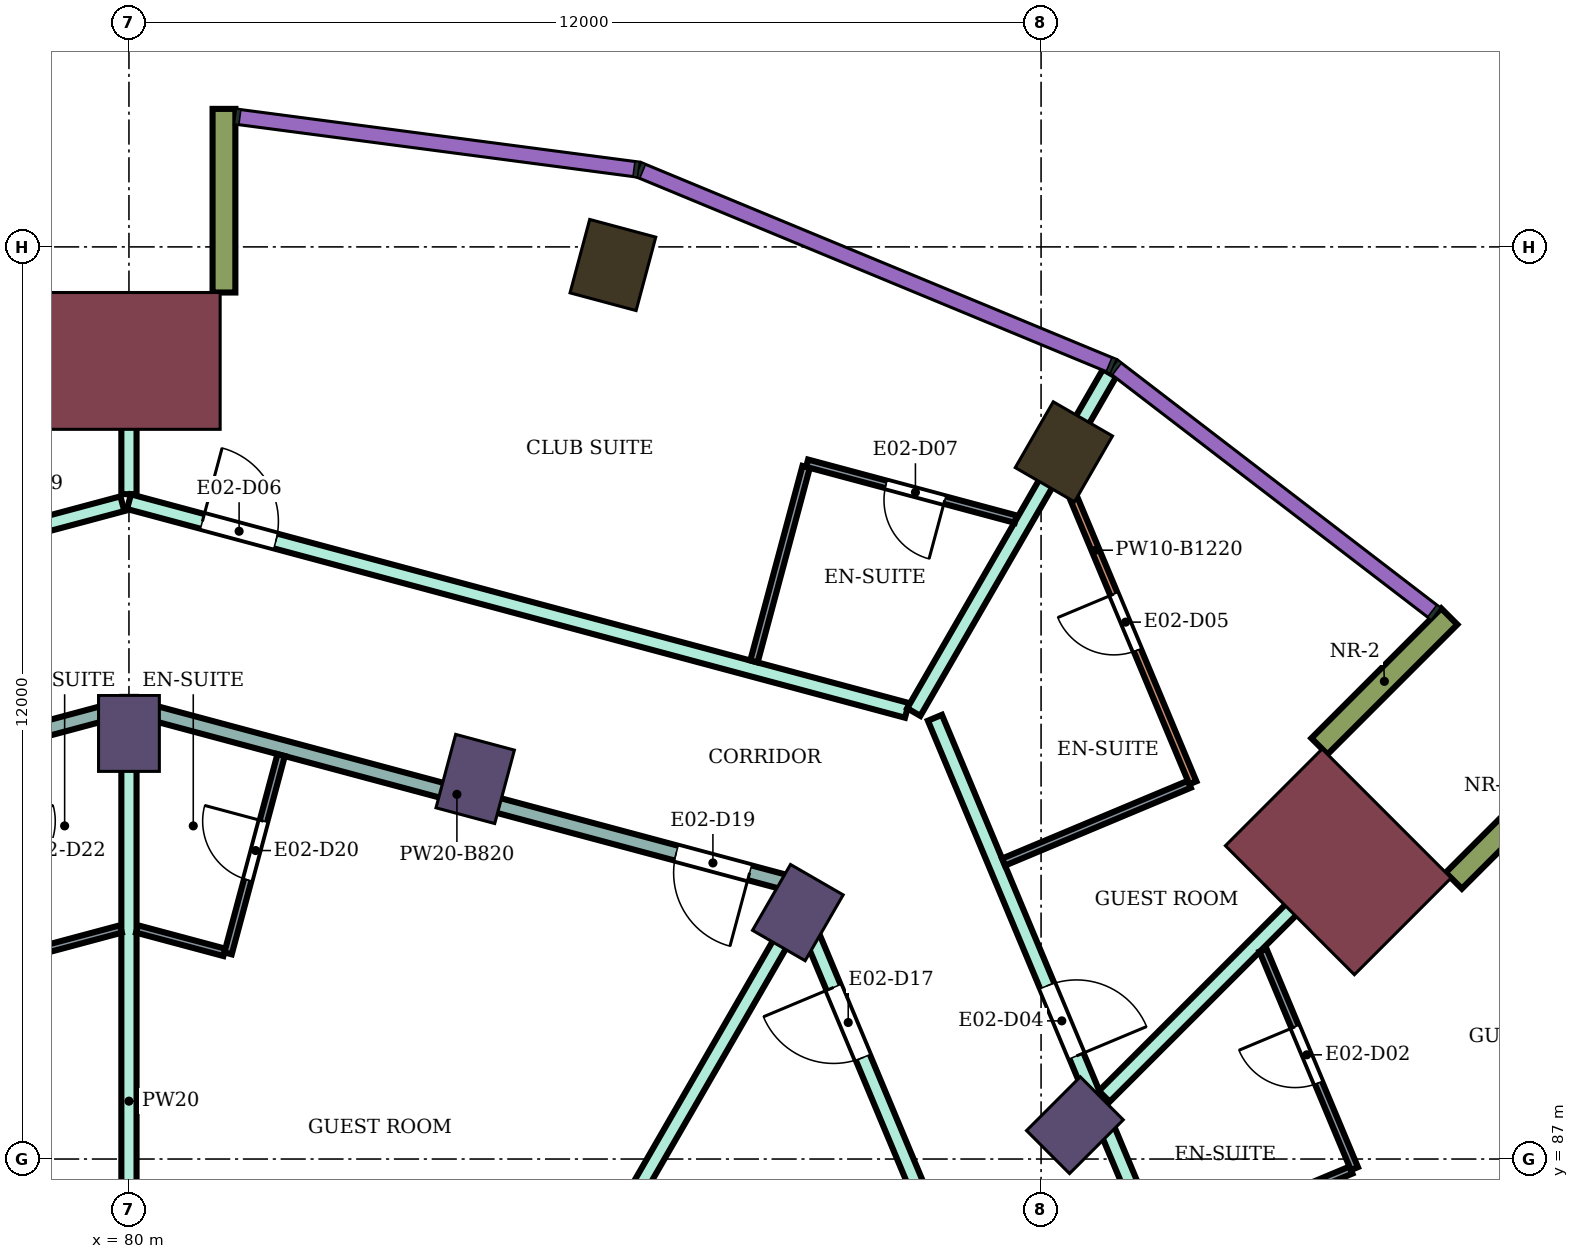
"""IFC4 building model, lengths in metres.
Left out: names, types, materials, properties, quantities, classifications, styles, units other than length and angle.
Written with IfcOpenShell. Run it as: python <this file> out.ifc"""

import sys

from ifc_helpers import new_model, si_unit, direction, frame, frame_2d, origin, origin_2d, place, context, subcontext, project, spatial, rectangle, extrude, element, fill, save


model = new_model("IFC4")
c1 = context("Model", 3, precision=1e-05, world=origin(), true_north=direction((0.0, 1.0)))
c2 = subcontext(c1, "Body", "Model", "MODEL_VIEW")
j1 = project(units=[si_unit("LENGTHUNIT", "METRE"), si_unit("PLANEANGLEUNIT", "RADIAN")], contexts=[c1])
p1 = place(None, origin())
s1 = spatial("IfcSite", under=j1, at=p1, CompositionType="ELEMENT")
p2 = place(p1, origin())
s2 = spatial("IfcBuilding", under=s1, at=p2, CompositionType="ELEMENT")
p3 = place(p2, frame((0.0, 0.0, 130.2)))
s3 = spatial("IfcBuildingStorey", under=s2, at=p3, CompositionType="ELEMENT", Elevation=130.2)
for number, where, z_axis, x_axis in (
    (1, (92.3, 96.304, 0.0), (0.0, 0.0, 1.0), (0.5, 0.866, 0.0)),
    (2, (86.367, 98.762, 0.0), (0.0, 0.0, 1.0), (0.259, 0.966, 0.0)),
):
    element("IfcColumn", number, at=place(p3, frame(where, z_axis=z_axis, x_axis=x_axis)), inside=s3, PredefinedType="COLUMN", context=c2, shape_type="SweptSolid", body=[
        extrude(rectangle(XDim=1.0, YDim=0.9, at=origin_2d()), origin(), (0.0, 0.0, 1.0), 3.9),
    ])
for number, where, z_axis, x_axis in (
    (3, (92.445, 87.445, 0.0), (0.0, 0.0, 1.0), (0.707, 0.707, 0.0)),
    (4, (88.8, 90.242, 0.0), (0.0, 0.0, 1.0), (0.5, 0.866, 0.0)),
    (5, (84.555, 92.0, 0.0), (0.0, 0.0, 1.0), (0.259, 0.966, 0.0)),
    (6, (80.0, 92.6, 0.0), (0.0, 0.0, 1.0), (0.0, 1.0, 0.0)),
):
    element("IfcColumn", number, at=place(p3, frame(where, z_axis=z_axis, x_axis=x_axis)), inside=s3, PredefinedType="COLUMN", context=c2, shape_type="SweptSolid", body=[
        extrude(rectangle(XDim=1.0, YDim=0.8, at=origin_2d()), origin(), (0.0, 0.0, 1.0), 3.9),
    ])
for number, where, z_axis, x_axis in (
    (7, (95.91, 90.91, 0.0), (0.0, 0.0, 1.0), (0.707, 0.707, 0.0)),
    (8, (80.0, 97.5, 0.0), (0.0, 0.0, 1.0), (0.0, 1.0, 0.0)),
):
    element("IfcColumn", number, at=place(p3, frame(where, z_axis=z_axis, x_axis=x_axis)), inside=s3, PredefinedType="COLUMN", context=c2, shape_type="SweptSolid", body=[
        extrude(rectangle(XDim=1.8, YDim=2.4, at=origin_2d()), origin(), (0.0, 0.0, 1.0), 3.9),
    ])
for number, where, z_axis, x_axis in (
    (9, (97.43, 90.662, 0.0), (0.0, 0.0, 1.0), (0.707, 0.707, 0.0)),
    (10, (95.662, 92.43, 0.0), (0.0, 0.0, 1.0), (0.707, 0.707, 0.0)),
    (11, (81.25, 98.4, 0.0), (0.0, 0.0, 1.0), (0.0, 1.0, 0.0)),
):
    element("IfcWall", number, at=place(p3, frame(where, z_axis=z_axis, x_axis=x_axis)), inside=s3, PredefinedType="NOTDEFINED", context=c2, shape_type="SweptSolid", body=[
        extrude(rectangle(XDim=2.416, YDim=0.3, at=frame_2d((1.208, 0.0))), origin(), (0.0, 0.0, 1.0), 3.9),
    ])
p4 = place(p3, frame((69.397, 92.805, 0.0), z_axis=(0.0, 0.0, 1.0), x_axis=(0.965971666602, 0.258647906087, 0.0)))
e12 = element("IfcWall", 12, at=p4, inside=s3, PredefinedType="PARTITIONING", context=c2, shape_type="SweptSolid", body=[
    extrude(rectangle(XDim=10.887, YDim=0.2, at=frame_2d((5.443, 0.0))), origin(), (0.0, 0.0, 1.0), 3.45),
])
p5 = place(p4, frame((6.163, 0.0, 0.0)))
e13 = element("IfcOpeningElement", 13, at=p5, cuts=e12, PredefinedType="OPENING", context=c2, shape_type="SweptSolid", body=[
    extrude(rectangle(XDim=1.0, YDim=2.1, at=frame_2d((0.5, 1.05))), frame((0.0, 0.11, 0.0), z_axis=(0.0, -1.0, 0.0), x_axis=(1.0, 0.0, 0.0)), (0.0, 0.0, 1.0), 0.22),
])
p6 = place(p4, frame((2.461, 0.0, 0.0)))
e14 = element("IfcOpeningElement", 14, at=p6, cuts=e12, PredefinedType="OPENING", context=c2, shape_type="SweptSolid", body=[
    extrude(rectangle(XDim=1.0, YDim=2.1, at=frame_2d((0.5, 1.05))), frame((0.0, 0.11, 0.0), z_axis=(0.0, -1.0, 0.0), x_axis=(1.0, 0.0, 0.0)), (0.0, 0.0, 1.0), 0.22),
])
p7 = place(p3, frame((71.303, 90.625, 0.0), z_axis=(0.0, 0.0, 1.0), x_axis=(0.965971868307, 0.258647152776, 0.0)))
e15 = element("IfcWall", 15, at=p7, inside=s3, PredefinedType="PARTITIONING", context=c2, shape_type="SweptSolid", body=[
    extrude(rectangle(XDim=8.874, YDim=0.2, at=frame_2d((4.437, 0.0))), origin(), (0.0, 0.0, 1.0), 3.08),
])
p8 = place(p7, frame((0.55, 0.0, 0.0)))
e16 = element("IfcOpeningElement", 16, at=p8, cuts=e15, PredefinedType="OPENING", context=c2, shape_type="SweptSolid", body=[
    extrude(rectangle(XDim=1.0, YDim=2.1, at=frame_2d((0.5, 1.05))), frame((0.0, 0.11, 0.0), z_axis=(0.0, -1.0, 0.0), x_axis=(1.0, 0.0, 0.0)), (0.0, 0.0, 1.0), 0.22),
])
p9 = place(p3, frame((80.0, 82.699, 0.0), z_axis=(0.0, 0.0, 1.0), x_axis=(0.0, 1.0, 0.0)))
e17 = element("IfcWall", 17, at=p9, inside=s3, PredefinedType="PARTITIONING", context=c2, shape_type="SweptSolid", body=[
    extrude(rectangle(XDim=10.125, YDim=0.2, at=frame_2d((5.062, 0.0))), origin(), (0.0, 0.0, 1.0), 3.45),
])
p10 = place(p3, frame((80.0, 92.954, 0.0), z_axis=(0.0, 0.0, 1.0), x_axis=(0.96592536278, -0.258820774936, 0.0)))
e18 = element("IfcWall", 18, at=p10, inside=s3, PredefinedType="PARTITIONING", context=c2, shape_type="SweptSolid", body=[
    extrude(rectangle(XDim=8.934, YDim=0.2, at=frame_2d((4.467, 0.0))), origin(), (0.0, 0.0, 1.0), 3.08),
])
p11 = place(p10, frame((7.454, 0.0, 0.0)))
e19 = element("IfcOpeningElement", 19, at=p11, cuts=e18, PredefinedType="OPENING", context=c2, shape_type="SweptSolid", body=[
    extrude(rectangle(XDim=1.0, YDim=2.1, at=frame_2d((0.5, 1.05))), frame((0.0, 0.11, 0.0), z_axis=(0.0, -1.0, 0.0), x_axis=(1.0, 0.0, 0.0)), (0.0, 0.0, 1.0), 0.22),
])
p12 = place(p3, frame((80.0, 95.747, 0.0), z_axis=(0.0, 0.0, 1.0), x_axis=(0.0, 1.0, 0.0)))
e20 = element("IfcWall", 20, at=p12, inside=s3, PredefinedType="PARTITIONING", context=c2, shape_type="SweptSolid", body=[
    extrude(rectangle(XDim=2.452, YDim=0.2, at=frame_2d((1.226, 0.0))), origin(), (0.0, 0.0, 1.0), 3.45),
])
p13 = place(p3, frame((80.0, 95.648, 0.0), z_axis=(0.0, 0.0, 1.0), x_axis=(0.965852259202, -0.259093445292, 0.0)))
e21 = element("IfcWall", 21, at=p13, inside=s3, PredefinedType="PARTITIONING", context=c2, shape_type="SweptSolid", body=[
    extrude(rectangle(XDim=10.597, YDim=0.2, at=frame_2d((5.298, 0.0))), origin(), (0.0, 0.0, 1.0), 3.45),
])
p14 = place(p13, frame((1.0, 0.0, 0.0)))
e22 = element("IfcOpeningElement", 22, at=p14, cuts=e21, PredefinedType="OPENING", context=c2, shape_type="SweptSolid", body=[
    extrude(rectangle(XDim=1.0, YDim=2.1, at=frame_2d((0.5, 1.05))), frame((0.0, 0.11, 0.0), z_axis=(0.0, -1.0, 0.0), x_axis=(1.0, 0.0, 0.0)), (0.0, 0.0, 1.0), 0.22),
])
p15 = place(p3, frame((83.85, 81.667, 0.0), z_axis=(0.0, 0.0, 1.0), x_axis=(0.500092047414, 0.865972253663, 0.0)))
e23 = element("IfcWall", 23, at=p15, inside=s3, PredefinedType="PARTITIONING", context=c2, shape_type="SweptSolid", body=[
    extrude(rectangle(XDim=9.778, YDim=0.2, at=frame_2d((4.889, 0.0))), origin(), (0.0, 0.0, 1.0), 3.45),
])
p16 = place(p3, frame((88.698, 90.624, 0.0), z_axis=(0.0, 0.0, 1.0), x_axis=(0.386027055918, -0.922487459047, 0.0)))
e24 = element("IfcWall", 24, at=p16, inside=s3, PredefinedType="PARTITIONING", context=c2, shape_type="SweptSolid", body=[
    extrude(rectangle(XDim=7.832, YDim=0.2, at=frame_2d((3.916, 0.0))), origin(), (0.0, 0.0, 1.0), 3.45),
])
p17 = place(p16, frame((1.482, 0.0, 0.0)))
e25 = element("IfcOpeningElement", 25, at=p17, cuts=e24, PredefinedType="OPENING", context=c2, shape_type="SweptSolid", body=[
    extrude(rectangle(XDim=1.0, YDim=2.1, at=frame_2d((0.5, 1.05))), frame((0.0, 0.11, 0.0), z_axis=(0.0, -1.0, 0.0), x_axis=(1.0, 0.0, 0.0)), (0.0, 0.0, 1.0), 0.22),
])
p18 = place(p3, frame((90.325, 92.88, 0.0), z_axis=(0.0, 0.0, 1.0), x_axis=(0.500084891114, 0.865976386329, 0.0)))
e26 = element("IfcWall", 26, at=p18, inside=s3, PredefinedType="PARTITIONING", context=c2, shape_type="SweptSolid", body=[
    extrude(rectangle(XDim=5.15, YDim=0.2, at=frame_2d((2.575, 0.0))), origin(), (0.0, 0.0, 1.0), 3.45),
])
p19 = place(p3, frame((90.604, 92.805, 0.0), z_axis=(0.0, 0.0, 1.0), x_axis=(0.386199042801, -0.922415470024, 0.0)))
e27 = element("IfcWall", 27, at=p19, inside=s3, PredefinedType="PARTITIONING", context=c2, shape_type="SweptSolid", body=[
    extrude(rectangle(XDim=8.48, YDim=0.2, at=frame_2d((4.24, 0.0))), origin(), (0.0, 0.0, 1.0), 3.45),
])
p20 = place(p19, frame((3.823, 0.0, 0.0)))
e28 = element("IfcOpeningElement", 28, at=p20, cuts=e27, PredefinedType="OPENING", context=c2, shape_type="SweptSolid", body=[
    extrude(rectangle(XDim=1.0, YDim=2.1, at=frame_2d((0.5, 1.05))), frame((0.0, 0.11, 0.0), z_axis=(0.0, -1.0, 0.0), x_axis=(1.0, 0.0, 0.0)), (0.0, 0.0, 1.0), 0.22),
])
p21 = place(p3, frame((92.832, 87.825, 0.0), z_axis=(0.0, 0.0, 1.0), x_axis=(0.707275688599, 0.706937833418, 0.0)))
e29 = element("IfcWall", 29, at=p21, inside=s3, PredefinedType="PARTITIONING", context=c2, shape_type="SweptSolid", body=[
    extrude(rectangle(XDim=5.058, YDim=0.2, at=frame_2d((2.529, 0.0))), origin(), (0.0, 0.0, 1.0), 3.45),
])
p22 = place(p3, frame((78.696, 89.706, 0.0), z_axis=(0.0, 0.0, 1.0), x_axis=(0.966002513606, 0.258532674351, 0.0)))
e30 = element("IfcWall", 30, at=p22, inside=s3, PredefinedType="PARTITIONING", context=c2, shape_type="SweptSolid", body=[
    extrude(rectangle(XDim=1.24, YDim=0.1, at=frame_2d((0.62, 0.0))), origin(), (0.0, 0.0, 1.0), 3.45),
])
p23 = place(p3, frame((80.106, 90.027, 0.0), z_axis=(0.0, 0.0, 1.0), x_axis=(0.966002973184, -0.258530957139, 0.0)))
e31 = element("IfcWall", 31, at=p23, inside=s3, PredefinedType="PARTITIONING", context=c2, shape_type="SweptSolid", body=[
    extrude(rectangle(XDim=1.19, YDim=0.1, at=frame_2d((0.595, 0.0))), origin(), (0.0, 0.0, 1.0), 3.45),
])
p24 = place(p3, frame((81.304, 89.706, 0.0), z_axis=(0.0, 0.0, 1.0), x_axis=(0.258608022684, 0.965982344872, 0.0)))
e32 = element("IfcWall", 32, at=p24, inside=s3, PredefinedType="PARTITIONING", context=c2, shape_type="SweptSolid", body=[
    extrude(rectangle(XDim=2.7, YDim=0.1, at=frame_2d((1.35, 0.0))), origin(), (0.0, 0.0, 1.0), 3.45),
])
p25 = place(p24, frame((1.0, 0.0, 0.0)))
e33 = element("IfcOpeningElement", 33, at=p25, cuts=e32, PredefinedType="OPENING", context=c2, shape_type="SweptSolid", body=[
    extrude(rectangle(XDim=0.8, YDim=2.1, at=frame_2d((0.4, 1.05))), frame((0.0, 0.06, 0.0), z_axis=(0.0, -1.0, 0.0), x_axis=(1.0, 0.0, 0.0)), (0.0, 0.0, 1.0), 0.12),
])
p26 = place(p3, frame((88.223, 93.547, 0.0), z_axis=(0.0, 0.0, 1.0), x_axis=(0.259021640683, 0.965871518194, 0.0)))
e34 = element("IfcWall", 34, at=p26, inside=s3, PredefinedType="PARTITIONING", context=c2, shape_type="SweptSolid", body=[
    extrude(rectangle(XDim=2.649, YDim=0.1, at=frame_2d((1.325, 0.0))), origin(), (0.0, 0.0, 1.0), 3.45),
])
p27 = place(p3, frame((88.922, 96.154, 0.0), z_axis=(0.0, 0.0, 1.0), x_axis=(0.965887418767, -0.258962341408, 0.0)))
e35 = element("IfcWall", 35, at=p27, inside=s3, PredefinedType="PARTITIONING", context=c2, shape_type="SweptSolid", body=[
    extrude(rectangle(XDim=2.841, YDim=0.1, at=frame_2d((1.42, 0.0))), origin(), (0.0, 0.0, 1.0), 3.45),
])
p28 = place(p27, frame((1.075, 0.0, 0.0)))
e36 = element("IfcOpeningElement", 36, at=p28, cuts=e35, PredefinedType="OPENING", context=c2, shape_type="SweptSolid", body=[
    extrude(rectangle(XDim=0.8, YDim=2.1, at=frame_2d((0.4, 1.05))), frame((0.0, 0.06, 0.0), z_axis=(0.0, -1.0, 0.0), x_axis=(1.0, 0.0, 0.0)), (0.0, 0.0, 1.0), 0.12),
])
p29 = place(p3, frame((91.507, 90.907, 0.0), z_axis=(0.0, 0.0, 1.0), x_axis=(0.922344808264, 0.38636777126, 0.0)))
e37 = element("IfcWall", 37, at=p29, inside=s3, PredefinedType="PARTITIONING", context=c2, shape_type="SweptSolid", body=[
    extrude(rectangle(XDim=2.65, YDim=0.1, at=frame_2d((1.325, 0.0))), origin(), (0.0, 0.0, 1.0), 3.45),
])
p30 = place(p3, frame((92.289, 96.03, 0.0), z_axis=(0.0, 0.0, 1.0), x_axis=(0.386237487323, -0.922399373041, 0.0)))
e38 = element("IfcWall", 38, at=p30, inside=s3, PredefinedType="PARTITIONING", context=c2, shape_type="SweptSolid", body=[
    extrude(rectangle(XDim=4.423, YDim=0.1, at=frame_2d((2.211, 0.0))), origin(), (0.0, 0.0, 1.0), 2.68),
])
p31 = place(p30, frame((1.731, 0.0, 0.0)))
e39 = element("IfcOpeningElement", 39, at=p31, cuts=e38, PredefinedType="OPENING", context=c2, shape_type="SweptSolid", body=[
    extrude(rectangle(XDim=0.8, YDim=2.1, at=frame_2d((0.4, 1.05))), frame((0.0, 0.06, 0.0), z_axis=(0.0, -1.0, 0.0), x_axis=(1.0, 0.0, 0.0)), (0.0, 0.0, 1.0), 0.12),
])
p32 = place(p3, frame((93.633, 85.831, 0.0), z_axis=(0.0, 0.0, 1.0), x_axis=(0.922344808264, 0.38636777126, 0.0)))
e40 = element("IfcWall", 40, at=p32, inside=s3, PredefinedType="PARTITIONING", context=c2, shape_type="SweptSolid", body=[
    extrude(rectangle(XDim=2.65, YDim=0.1, at=frame_2d((1.325, 0.0))), origin(), (0.0, 0.0, 1.0), 3.45),
])
p33 = place(p3, frame((94.8, 83.545, 0.0), z_axis=(0.0, 0.0, 1.0), x_axis=(0.86602264145, 0.500004784474, 0.0)))
e41 = element("IfcWall", 41, at=p33, inside=s3, PredefinedType="PARTITIONING", context=c2, shape_type="SweptSolid", body=[
    extrude(rectangle(XDim=8.708, YDim=0.1, at=frame_2d((4.354, 0.0))), origin(), (0.0, 0.0, 1.0), 3.45),
])
p34 = place(p33, frame((3.879, 0.0, 0.0)))
e42 = element("IfcOpeningElement", 42, at=p34, cuts=e41, PredefinedType="OPENING", context=c2, shape_type="SweptSolid", body=[
    extrude(rectangle(XDim=0.9, YDim=2.1, at=frame_2d((0.45, 1.05))), frame((0.0, 0.06, 0.0), z_axis=(0.0, -1.0, 0.0), x_axis=(1.0, 0.0, 0.0)), (0.0, 0.0, 1.0), 0.12),
])
p35 = place(p3, frame((94.919, 89.748, 0.0), z_axis=(0.0, 0.0, 1.0), x_axis=(0.386255913529, -0.922391657196, 0.0)))
e43 = element("IfcWall", 43, at=p35, inside=s3, PredefinedType="PARTITIONING", context=c2, shape_type="SweptSolid", body=[
    extrude(rectangle(XDim=3.116, YDim=0.1, at=frame_2d((1.558, 0.0))), origin(), (0.0, 0.0, 1.0), 3.45),
])
p36 = place(p35, frame((1.093, 0.0, 0.0)))
e44 = element("IfcOpeningElement", 44, at=p36, cuts=e43, PredefinedType="OPENING", context=c2, shape_type="SweptSolid", body=[
    extrude(rectangle(XDim=0.8, YDim=2.1, at=frame_2d((0.4, 1.05))), frame((0.0, 0.06, 0.0), z_axis=(0.0, -1.0, 0.0), x_axis=(1.0, 0.0, 0.0)), (0.0, 0.0, 1.0), 0.12),
])
p37 = place(p36, frame((0.8, 0.0, 0.0), z_axis=(0.0, 0.0, 1.0), x_axis=(-1.0, 0.0, 0.0)))
e45 = element("IfcDoor", 45, at=p37, inside=s3, OperationType="SINGLE_SWING_RIGHT", PredefinedType="DOOR", context=c2, shape_type="SweptSolid", body=[
    extrude(rectangle(XDim=0.8, YDim=2.1, at=frame_2d((0.4, 1.05))), frame((0.0, 0.025, 0.0), z_axis=(0.0, -1.0, 0.0), x_axis=(1.0, 0.0, 0.0)), (0.0, 0.0, 1.0), 0.05),
])
fill(e44, e45)
p38 = place(p20, origin())
e46 = element("IfcDoor", 46, at=p38, inside=s3, OperationType="SINGLE_SWING_RIGHT", PredefinedType="DOOR", context=c2, shape_type="SweptSolid", body=[
    extrude(rectangle(XDim=1.0, YDim=2.1, at=frame_2d((0.5, 1.05))), frame((0.0, 0.025, 0.0), z_axis=(0.0, -1.0, 0.0), x_axis=(1.0, 0.0, 0.0)), (0.0, 0.0, 1.0), 0.05),
])
fill(e28, e46)
p39 = place(p31, frame((0.8, 0.0, 0.0), z_axis=(0.0, 0.0, 1.0), x_axis=(-1.0, 0.0, 0.0)))
e47 = element("IfcDoor", 47, at=p39, inside=s3, OperationType="SINGLE_SWING_RIGHT", PredefinedType="DOOR", context=c2, shape_type="SweptSolid", body=[
    extrude(rectangle(XDim=0.8, YDim=2.1, at=frame_2d((0.4, 1.05))), frame((0.0, 0.025, 0.0), z_axis=(0.0, -1.0, 0.0), x_axis=(1.0, 0.0, 0.0)), (0.0, 0.0, 1.0), 0.05),
])
fill(e39, e47)
p40 = place(p14, origin())
e48 = element("IfcDoor", 48, at=p40, inside=s3, OperationType="SINGLE_SWING_LEFT", PredefinedType="DOOR", context=c2, shape_type="SweptSolid", body=[
    extrude(rectangle(XDim=1.0, YDim=2.1, at=frame_2d((0.5, 1.05))), frame((0.0, 0.025, 0.0), z_axis=(0.0, -1.0, 0.0), x_axis=(1.0, 0.0, 0.0)), (0.0, 0.0, 1.0), 0.05),
])
fill(e22, e48)
p41 = place(p28, frame((0.8, 0.0, 0.0), z_axis=(0.0, 0.0, 1.0), x_axis=(-1.0, 0.0, 0.0)))
e49 = element("IfcDoor", 49, at=p41, inside=s3, OperationType="SINGLE_SWING_LEFT", PredefinedType="DOOR", context=c2, shape_type="SweptSolid", body=[
    extrude(rectangle(XDim=0.8, YDim=2.1, at=frame_2d((0.4, 1.05))), frame((0.0, 0.025, 0.0), z_axis=(0.0, -1.0, 0.0), x_axis=(1.0, 0.0, 0.0)), (0.0, 0.0, 1.0), 0.05),
])
fill(e36, e49)
p42 = place(p17, frame((1.0, 0.0, 0.0), z_axis=(0.0, 0.0, 1.0), x_axis=(-1.0, 0.0, 0.0)))
e50 = element("IfcDoor", 50, at=p42, inside=s3, OperationType="SINGLE_SWING_RIGHT", PredefinedType="DOOR", context=c2, shape_type="SweptSolid", body=[
    extrude(rectangle(XDim=1.0, YDim=2.1, at=frame_2d((0.5, 1.05))), frame((0.0, 0.025, 0.0), z_axis=(0.0, -1.0, 0.0), x_axis=(1.0, 0.0, 0.0)), (0.0, 0.0, 1.0), 0.05),
])
fill(e25, e50)
p43 = place(p11, frame((1.0, 0.0, 0.0), z_axis=(0.0, 0.0, 1.0), x_axis=(-1.0, 0.0, 0.0)))
e51 = element("IfcDoor", 51, at=p43, inside=s3, OperationType="SINGLE_SWING_LEFT", PredefinedType="DOOR", context=c2, shape_type="SweptSolid", body=[
    extrude(rectangle(XDim=1.0, YDim=2.1, at=frame_2d((0.5, 1.05))), frame((0.0, 0.025, 0.0), z_axis=(0.0, -1.0, 0.0), x_axis=(1.0, 0.0, 0.0)), (0.0, 0.0, 1.0), 0.05),
])
fill(e19, e51)
p44 = place(p25, origin())
e52 = element("IfcDoor", 52, at=p44, inside=s3, OperationType="SINGLE_SWING_RIGHT", PredefinedType="DOOR", context=c2, shape_type="SweptSolid", body=[
    extrude(rectangle(XDim=0.8, YDim=2.1, at=frame_2d((0.4, 1.05))), frame((0.0, 0.025, 0.0), z_axis=(0.0, -1.0, 0.0), x_axis=(1.0, 0.0, 0.0)), (0.0, 0.0, 1.0), 0.05),
])
fill(e33, e52)
save(model, sys.argv[1])
